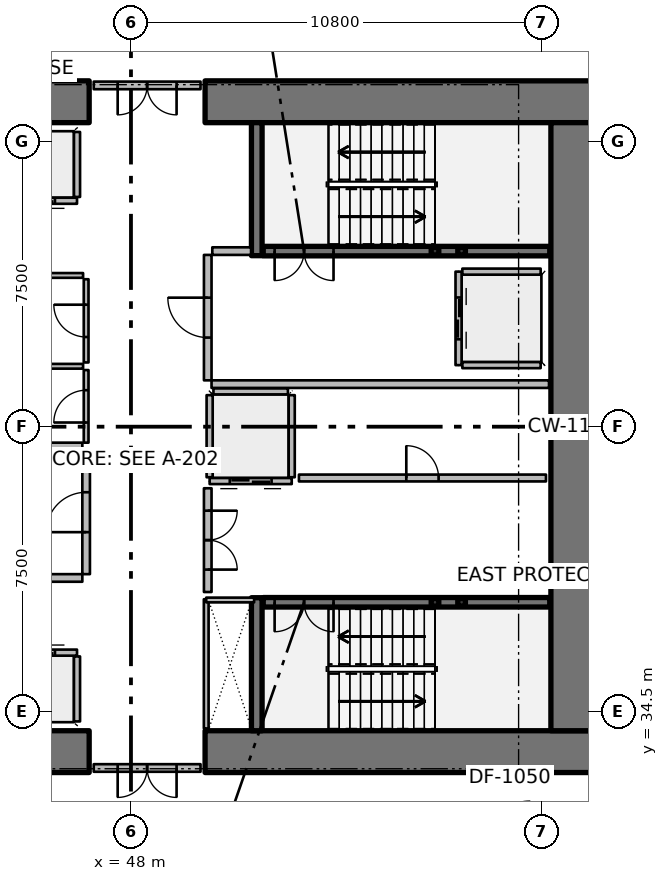
"""IFC4 building model, lengths in metres.
Left out: names, types, materials, properties, quantities, classifications, styles, units other than length and angle.
Written with IfcOpenShell. Run it as: python <this file> out.ifc"""

import sys

from ifc_helpers import new_model, si_unit, direction, frame, frame_2d, origin, origin_2d, place, context, subcontext, project, spatial, rectangle, hollow_rectangle, extrude, element, fill, save


model = new_model("IFC4")
c1 = context("Model", 3, precision=1e-05, world=origin(), true_north=direction((0.0, 1.0)))
c2 = subcontext(c1, "Body", "Model", "MODEL_VIEW")
j1 = project(units=[si_unit("LENGTHUNIT", "METRE"), si_unit("PLANEANGLEUNIT", "RADIAN")], contexts=[c1])
p1 = place(None, origin())
s1 = spatial("IfcSite", under=j1, at=p1, CompositionType="ELEMENT")
p2 = place(p1, origin())
s2 = spatial("IfcBuilding", under=s1, at=p2, CompositionType="ELEMENT")
p3 = place(p2, origin())
s3 = spatial("IfcBuildingStorey", under=s2, at=p3, CompositionType="ELEMENT", Elevation=0.0)
for number, where, z_axis, x_axis in (
    (1, (36.7, 33.45, 0.0), (0.0, 0.0, 1.0), (1.0, 0.0, 0.0)),
    (2, (49.95, 33.45, 0.0), (0.0, 0.0, 1.0), (1.0, 0.0, 0.0)),
    (3, (36.7, 50.55, 0.0), (0.0, 0.0, 1.0), (1.0, 0.0, 0.0)),
    (4, (49.95, 50.55, 0.0), (0.0, 0.0, 1.0), (1.0, 0.0, 0.0)),
):
    element("IfcWall", number, at=place(p3, frame(where, z_axis=z_axis, x_axis=x_axis)), inside=s3, PredefinedType="SHEAR", context=c2, shape_type="SweptSolid", body=[
        extrude(rectangle(XDim=10.2, YDim=1.1, at=frame_2d((5.1, 0.0))), origin(), (0.0, 0.0, 1.0), 7.2),
    ])
p4 = place(p3, frame((59.6, 34.0, 0.0), z_axis=(0.0, 0.0, 1.0), x_axis=(0.0, 1.0, 0.0)))
e5 = element("IfcWall", 5, at=p4, inside=s3, PredefinedType="SHEAR", context=c2, shape_type="SweptSolid", body=[
    extrude(rectangle(XDim=16.0, YDim=1.1, at=frame_2d((8.0, 0.0))), origin(), (0.0, 0.0, 1.0), 7.2),
])
for number, where, z_axis, x_axis in (
    (6, (51.31, 46.5, 0.0), (0.0, 0.0, 1.0), (0.0, 1.0, 0.0)),
    (7, (51.31, 34.0, 0.0), (0.0, 0.0, 1.0), (0.0, 1.0, 0.0)),
):
    element("IfcWall", number, at=place(p3, frame(where, z_axis=z_axis, x_axis=x_axis)), inside=s3, PredefinedType="SHEAR", context=c2, shape_type="SweptSolid", body=[
        extrude(rectangle(XDim=3.5, YDim=0.28, at=frame_2d((1.75, 0.0))), origin(), (0.0, 0.0, 1.0), 7.2),
    ])
p5 = place(p3, frame((56.0, 46.62, 0.0), z_axis=(0.0, 0.0, 1.0), x_axis=(1.0, 0.0, 0.0)))
e8 = element("IfcColumn", 8, at=p5, inside=s3, PredefinedType="COLUMN", context=c2, shape_type="SweptSolid", body=[
    extrude(hollow_rectangle(XDim=0.2, YDim=0.2, WallThickness=0.01, InnerFilletRadius=0.01, OuterFilletRadius=0.02, at=origin_2d()), origin(), (0.0, 0.0, 1.0), 1.595),
])
p6 = place(p3, frame((56.7, 46.62, 0.0), z_axis=(0.0, 0.0, 1.0), x_axis=(1.0, 0.0, 0.0)))
e9 = element("IfcColumn", 9, at=p6, inside=s3, PredefinedType="COLUMN", context=c2, shape_type="SweptSolid", body=[
    extrude(hollow_rectangle(XDim=0.2, YDim=0.2, WallThickness=0.01, InnerFilletRadius=0.01, OuterFilletRadius=0.02, at=origin_2d()), origin(), (0.0, 0.0, 1.0), 5.195),
])
p7 = place(p3, frame((56.0, 37.38, 0.0), z_axis=(0.0, 0.0, 1.0), x_axis=(1.0, 0.0, 0.0)))
e10 = element("IfcColumn", 10, at=p7, inside=s3, PredefinedType="COLUMN", context=c2, shape_type="SweptSolid", body=[
    extrude(hollow_rectangle(XDim=0.2, YDim=0.2, WallThickness=0.01, InnerFilletRadius=0.01, OuterFilletRadius=0.02, at=origin_2d()), origin(), (0.0, 0.0, 1.0), 1.595),
])
p8 = place(p3, frame((56.7, 37.38, 0.0), z_axis=(0.0, 0.0, 1.0), x_axis=(1.0, 0.0, 0.0)))
e11 = element("IfcColumn", 11, at=p8, inside=s3, PredefinedType="COLUMN", context=c2, shape_type="SweptSolid", body=[
    extrude(hollow_rectangle(XDim=0.2, YDim=0.2, WallThickness=0.01, InnerFilletRadius=0.01, OuterFilletRadius=0.02, at=origin_2d()), origin(), (0.0, 0.0, 1.0), 5.195),
])
p9 = place(p3, frame((51.48, 46.62, 0.0), z_axis=(0.0, 0.0, 1.0), x_axis=(1.0, 0.0, 0.0)))
e12 = element("IfcWall", 12, at=p9, inside=s3, PredefinedType="SOLIDWALL", context=c2, shape_type="SweptSolid", body=[
    extrude(rectangle(XDim=7.54, YDim=0.25, at=frame_2d((3.77, 0.0))), origin(), (0.0, 0.0, 1.0), 6.8),
])
p10 = place(p9, frame((0.3, 0.0, 0.0)))
e13 = element("IfcOpeningElement", 13, at=p10, cuts=e12, PredefinedType="OPENING", context=c2, shape_type="SweptSolid", body=[
    extrude(rectangle(XDim=1.55, YDim=2.15, at=frame_2d((0.775, 1.075))), frame((0.0, 0.135, 0.0), z_axis=(0.0, -1.0, 0.0), x_axis=(1.0, 0.0, 0.0)), (0.0, 0.0, 1.0), 0.27),
])
p11 = place(p3, frame((51.48, 37.38, 0.0), z_axis=(0.0, 0.0, 1.0), x_axis=(1.0, 0.0, 0.0)))
e14 = element("IfcWall", 14, at=p11, inside=s3, PredefinedType="SOLIDWALL", context=c2, shape_type="SweptSolid", body=[
    extrude(rectangle(XDim=7.54, YDim=0.25, at=frame_2d((3.77, 0.0))), origin(), (0.0, 0.0, 1.0), 6.8),
])
p12 = place(p11, frame((0.3, 0.0, 0.0)))
e15 = element("IfcOpeningElement", 15, at=p12, cuts=e14, PredefinedType="OPENING", context=c2, shape_type="SweptSolid", body=[
    extrude(rectangle(XDim=1.55, YDim=2.15, at=frame_2d((0.775, 1.075))), frame((0.0, 0.135, 0.0), z_axis=(0.0, -1.0, 0.0), x_axis=(1.0, 0.0, 0.0)), (0.0, 0.0, 1.0), 0.27),
])
p13 = place(p3, frame((46.58, 47.945, 0.0), z_axis=(0.0, 0.0, 1.0), x_axis=(-1.0, 0.0, 0.0)))
e16 = element("IfcWall", 16, at=p13, inside=s3, PredefinedType="PARTITIONING", context=c2, shape_type="SweptSolid", body=[
    extrude(rectangle(XDim=2.26, YDim=0.16, at=frame_2d((1.13, 0.0))), origin(), (0.0, 0.0, 1.0), 6.8),
])
p14 = place(p13, frame((0.58, 0.0, 0.0)))
e17 = element("IfcOpeningElement", 17, at=p14, cuts=e16, PredefinedType="OPENING", context=c2, shape_type="SweptSolid", body=[
    extrude(rectangle(XDim=1.1, YDim=2.1, at=frame_2d((0.55, 1.05))), frame((0.0, 0.09, 0.0), z_axis=(0.0, -1.0, 0.0), x_axis=(1.0, 0.0, 0.0)), (0.0, 0.0, 1.0), 0.18),
])
p15 = place(p3, frame((46.58, 48.045, 0.0), z_axis=(0.0, 0.0, 1.0), x_axis=(0.0, 1.0, 0.0)))
e18 = element("IfcWall", 18, at=p15, inside=s3, PredefinedType="PARTITIONING", context=c2, shape_type="SweptSolid", body=[
    extrude(rectangle(XDim=1.71, YDim=0.16, at=frame_2d((0.855, 0.0))), origin(), (0.0, 0.0, 1.0), 6.8),
])
p16 = place(p3, frame((44.32, 36.055, 0.0), z_axis=(0.0, 0.0, 1.0), x_axis=(1.0, 0.0, 0.0)))
e19 = element("IfcWall", 19, at=p16, inside=s3, PredefinedType="PARTITIONING", context=c2, shape_type="SweptSolid", body=[
    extrude(rectangle(XDim=2.26, YDim=0.16, at=frame_2d((1.13, 0.0))), origin(), (0.0, 0.0, 1.0), 6.8),
])
p17 = place(p16, frame((0.58, 0.0, 0.0)))
e20 = element("IfcOpeningElement", 20, at=p17, cuts=e19, PredefinedType="OPENING", context=c2, shape_type="SweptSolid", body=[
    extrude(rectangle(XDim=1.1, YDim=2.1, at=frame_2d((0.55, 1.05))), frame((0.0, 0.09, 0.0), z_axis=(0.0, -1.0, 0.0), x_axis=(1.0, 0.0, 0.0)), (0.0, 0.0, 1.0), 0.18),
])
p18 = place(p3, frame((46.58, 34.245, 0.0), z_axis=(0.0, 0.0, 1.0), x_axis=(0.0, 1.0, 0.0)))
e21 = element("IfcWall", 21, at=p18, inside=s3, PredefinedType="PARTITIONING", context=c2, shape_type="SweptSolid", body=[
    extrude(rectangle(XDim=1.71, YDim=0.16, at=frame_2d((0.855, 0.0))), origin(), (0.0, 0.0, 1.0), 6.8),
])
p19 = place(p3, frame((56.62, 46.08, 0.0), z_axis=(0.0, 0.0, 1.0), x_axis=(0.0, -1.0, 0.0)))
e22 = element("IfcWall", 22, at=p19, inside=s3, PredefinedType="PARTITIONING", context=c2, shape_type="SweptSolid", body=[
    extrude(rectangle(XDim=2.46, YDim=0.16, at=frame_2d((1.23, 0.0))), origin(), (0.0, 0.0, 1.0), 6.8),
])
p20 = place(p19, frame((0.68, 0.0, 0.0)))
e23 = element("IfcOpeningElement", 23, at=p20, cuts=e22, PredefinedType="OPENING", context=c2, shape_type="SweptSolid", body=[
    extrude(rectangle(XDim=1.1, YDim=2.1, at=frame_2d((0.55, 1.05))), frame((0.0, 0.09, 0.0), z_axis=(0.0, -1.0, 0.0), x_axis=(1.0, 0.0, 0.0)), (0.0, 0.0, 1.0), 0.18),
])
for number, where, z_axis, x_axis in (
    (24, (56.72, 46.08, 0.0), (0.0, 0.0, 1.0), (1.0, 0.0, 0.0)),
    (25, (56.72, 43.62, 0.0), (0.0, 0.0, 1.0), (1.0, 0.0, 0.0)),
):
    element("IfcWall", number, at=place(p3, frame(where, z_axis=z_axis, x_axis=x_axis)), inside=s3, PredefinedType="PARTITIONING", context=c2, shape_type="SweptSolid", body=[
        extrude(rectangle(XDim=2.06, YDim=0.16, at=frame_2d((1.03, 0.0))), origin(), (0.0, 0.0, 1.0), 6.8),
    ])
p21 = place(p3, frame((52.23, 40.57, 0.0), z_axis=(0.0, 0.0, 1.0), x_axis=(-1.0, 0.0, 0.0)))
e26 = element("IfcWall", 26, at=p21, inside=s3, PredefinedType="PARTITIONING", context=c2, shape_type="SweptSolid", body=[
    extrude(rectangle(XDim=2.16, YDim=0.16, at=frame_2d((1.08, 0.0))), origin(), (0.0, 0.0, 1.0), 6.8),
])
p22 = place(p21, frame((0.53, 0.0, 0.0)))
e27 = element("IfcOpeningElement", 27, at=p22, cuts=e26, PredefinedType="OPENING", context=c2, shape_type="SweptSolid", body=[
    extrude(rectangle(XDim=1.1, YDim=2.1, at=frame_2d((0.55, 1.05))), frame((0.0, 0.09, 0.0), z_axis=(0.0, -1.0, 0.0), x_axis=(1.0, 0.0, 0.0)), (0.0, 0.0, 1.0), 0.18),
])
for number, where, z_axis, x_axis in (
    (28, (52.23, 40.67, 0.0), (0.0, 0.0, 1.0), (0.0, 1.0, 0.0)),
    (29, (50.07, 40.67, 0.0), (0.0, 0.0, 1.0), (0.0, 1.0, 0.0)),
):
    element("IfcWall", number, at=place(p3, frame(where, z_axis=z_axis, x_axis=x_axis)), inside=s3, PredefinedType="PARTITIONING", context=c2, shape_type="SweptSolid", body=[
        extrude(rectangle(XDim=2.16, YDim=0.16, at=frame_2d((1.08, 0.0))), origin(), (0.0, 0.0, 1.0), 6.8),
    ])
p23 = place(p3, frame((50.17, 42.93, 0.0), z_axis=(0.0, 0.0, 1.0), x_axis=(1.0, 0.0, 0.0)))
e30 = element("IfcWall", 30, at=p23, inside=s3, PredefinedType="PARTITIONING", context=c2, shape_type="SweptSolid", body=[
    extrude(rectangle(XDim=1.96, YDim=0.16, at=frame_2d((0.98, 0.0))), origin(), (0.0, 0.0, 1.0), 6.8),
])
p24 = place(p3, frame((52.42, 40.65, 0.0), z_axis=(0.0, 0.0, 1.0), x_axis=(1.0, 0.0, 0.0)))
e31 = element("IfcWall", 31, at=p24, inside=s3, PredefinedType="PARTITIONING", context=c2, shape_type="SweptSolid", body=[
    extrude(rectangle(XDim=6.5, YDim=0.18, at=frame_2d((3.25, 0.0))), origin(), (0.0, 0.0, 1.0), 6.8),
])
p25 = place(p24, frame((2.825, 0.0, 0.0)))
e32 = element("IfcOpeningElement", 32, at=p25, cuts=e31, PredefinedType="OPENING", context=c2, shape_type="SweptSolid", body=[
    extrude(rectangle(XDim=0.85, YDim=2.06, at=frame_2d((0.425, 1.03))), frame((0.0, 0.1, 0.0), z_axis=(0.0, -1.0, 0.0), x_axis=(1.0, 0.0, 0.0)), (0.0, 0.0, 1.0), 0.2),
])
p26 = place(p3, frame((47.02, 50.98, 0.0), z_axis=(0.0, 0.0, 1.0), x_axis=(1.0, 0.0, 0.0)))
e33 = element("IfcWall", 33, at=p26, inside=s3, PredefinedType="PARTITIONING", context=c2, shape_type="SweptSolid", body=[
    extrude(rectangle(XDim=2.81, YDim=0.2, at=frame_2d((1.405, 0.0))), origin(), (0.0, 0.0, 1.0), 6.8),
])
p27 = place(p26, frame((0.63, 0.0, 0.0)))
e34 = element("IfcOpeningElement", 34, at=p27, cuts=e33, PredefinedType="OPENING", context=c2, shape_type="SweptSolid", body=[
    extrude(rectangle(XDim=1.55, YDim=2.15, at=frame_2d((0.775, 1.075))), frame((0.0, 0.11, 0.0), z_axis=(0.0, -1.0, 0.0), x_axis=(1.0, 0.0, 0.0)), (0.0, 0.0, 1.0), 0.22),
])
p28 = place(p3, frame((47.02, 33.02, 0.0), z_axis=(0.0, 0.0, 1.0), x_axis=(1.0, 0.0, 0.0)))
e35 = element("IfcWall", 35, at=p28, inside=s3, PredefinedType="PARTITIONING", context=c2, shape_type="SweptSolid", body=[
    extrude(rectangle(XDim=2.81, YDim=0.2, at=frame_2d((1.405, 0.0))), origin(), (0.0, 0.0, 1.0), 6.8),
])
p29 = place(p28, frame((0.63, 0.0, 0.0)))
e36 = element("IfcOpeningElement", 36, at=p29, cuts=e35, PredefinedType="OPENING", context=c2, shape_type="SweptSolid", body=[
    extrude(rectangle(XDim=1.55, YDim=2.15, at=frame_2d((0.775, 1.075))), frame((0.0, 0.11, 0.0), z_axis=(0.0, -1.0, 0.0), x_axis=(1.0, 0.0, 0.0)), (0.0, 0.0, 1.0), 0.22),
])
p30 = place(p3, frame((50.02, 37.65, 0.0), z_axis=(0.0, 0.0, 1.0), x_axis=(0.0, 1.0, 0.0)))
e37 = element("IfcWall", 37, at=p30, inside=s3, PredefinedType="PARTITIONING", context=c2, shape_type="SweptSolid", body=[
    extrude(rectangle(XDim=2.73, YDim=0.2, at=frame_2d((1.365, 0.0))), origin(), (0.0, 0.0, 1.0), 6.8),
])
p31 = place(p30, frame((0.59, 0.0, 0.0)))
e38 = element("IfcOpeningElement", 38, at=p31, cuts=e37, PredefinedType="OPENING", context=c2, shape_type="SweptSolid", body=[
    extrude(rectangle(XDim=1.55, YDim=2.15, at=frame_2d((0.775, 1.075))), frame((0.0, 0.11, 0.0), z_axis=(0.0, -1.0, 0.0), x_axis=(1.0, 0.0, 0.0)), (0.0, 0.0, 1.0), 0.22),
])
p32 = place(p3, frame((41.35, 38.02, 0.0), z_axis=(0.0, 0.0, 1.0), x_axis=(1.0, 0.0, 0.0)))
e39 = element("IfcWall", 39, at=p32, inside=s3, PredefinedType="PARTITIONING", context=c2, shape_type="SweptSolid", body=[
    extrude(rectangle(XDim=5.37, YDim=0.2, at=frame_2d((2.685, 0.0))), origin(), (0.0, 0.0, 1.0), 6.8),
])
p33 = place(p3, frame((43.92, 41.48, 0.0), z_axis=(0.0, 0.0, 1.0), x_axis=(1.0, 0.0, 0.0)))
e40 = element("IfcWall", 40, at=p33, inside=s3, PredefinedType="PARTITIONING", context=c2, shape_type="SweptSolid", body=[
    extrude(rectangle(XDim=2.8, YDim=0.2, at=frame_2d((1.4, 0.0))), origin(), (0.0, 0.0, 1.0), 6.8),
])
p34 = place(p3, frame((46.82, 38.12, 0.0), z_axis=(0.0, 0.0, 1.0), x_axis=(0.0, 1.0, 0.0)))
e41 = element("IfcWall", 41, at=p34, inside=s3, PredefinedType="PARTITIONING", context=c2, shape_type="SweptSolid", body=[
    extrude(rectangle(XDim=3.26, YDim=0.2, at=frame_2d((1.63, 0.0))), origin(), (0.0, 0.0, 1.0), 6.8),
])
p35 = place(p34, frame((1.105, 0.0, 0.0)))
e42 = element("IfcOpeningElement", 42, at=p35, cuts=e41, PredefinedType="OPENING", context=c2, shape_type="SweptSolid", body=[
    extrude(rectangle(XDim=1.05, YDim=2.1, at=frame_2d((0.525, 1.05))), frame((0.0, 0.11, 0.0), z_axis=(0.0, -1.0, 0.0), x_axis=(1.0, 0.0, 0.0)), (0.0, 0.0, 1.0), 0.22),
])
p36 = place(p3, frame((50.12, 43.12, 0.0), z_axis=(0.0, 0.0, 1.0), x_axis=(1.0, 0.0, 0.0)))
e43 = element("IfcWall", 43, at=p36, inside=s3, PredefinedType="PARTITIONING", context=c2, shape_type="SweptSolid", body=[
    extrude(rectangle(XDim=8.88, YDim=0.2, at=frame_2d((4.44, 0.0))), origin(), (0.0, 0.0, 1.0), 6.8),
])
p37 = place(p3, frame((50.14, 46.62, 0.0), z_axis=(0.0, 0.0, 1.0), x_axis=(1.0, 0.0, 0.0)))
e44 = element("IfcWall", 44, at=p37, inside=s3, PredefinedType="PARTITIONING", context=c2, shape_type="SweptSolid", body=[
    extrude(rectangle(XDim=1.02, YDim=0.2, at=frame_2d((0.51, 0.0))), origin(), (0.0, 0.0, 1.0), 6.8),
])
p38 = place(p3, frame((50.02, 43.22, 0.0), z_axis=(0.0, 0.0, 1.0), x_axis=(0.0, 1.0, 0.0)))
e45 = element("IfcWall", 45, at=p38, inside=s3, PredefinedType="PARTITIONING", context=c2, shape_type="SweptSolid", body=[
    extrude(rectangle(XDim=3.3, YDim=0.2, at=frame_2d((1.65, 0.0))), origin(), (0.0, 0.0, 1.0), 6.8),
])
p39 = place(p38, frame((1.125, 0.0, 0.0)))
e46 = element("IfcOpeningElement", 46, at=p39, cuts=e45, PredefinedType="OPENING", context=c2, shape_type="SweptSolid", body=[
    extrude(rectangle(XDim=1.05, YDim=2.1, at=frame_2d((0.525, 1.05))), frame((0.0, 0.11, 0.0), z_axis=(0.0, -1.0, 0.0), x_axis=(1.0, 0.0, 0.0)), (0.0, 0.0, 1.0), 0.22),
])
p40 = place(p3, frame((49.98, 34.06, 0.0), z_axis=(0.0, 0.0, 1.0), x_axis=(0.0, 1.0, 0.0)))
e47 = element("IfcWall", 47, at=p40, inside=s3, PredefinedType="PARTITIONING", context=c2, shape_type="SweptSolid", body=[
    extrude(rectangle(XDim=3.4, YDim=0.125, at=frame_2d((1.7, 0.0))), origin(), (0.0, 0.0, 1.0), 6.24),
])
p41 = place(p3, frame((49.98, 37.44, 0.0), z_axis=(0.0, 0.0, 1.0), x_axis=(1.0, 0.0, 0.0)))
e48 = element("IfcWall", 48, at=p41, inside=s3, PredefinedType="PARTITIONING", context=c2, shape_type="SweptSolid", body=[
    extrude(rectangle(XDim=1.26, YDim=0.125, at=frame_2d((0.63, 0.0))), origin(), (0.0, 0.0, 1.0), 6.24),
])
p42 = place(p3, frame((44.03, 43.59, 0.0), z_axis=(0.0, 0.0, 1.0), x_axis=(1.0, 0.0, 0.0)))
e49 = element("IfcWall", 49, at=p42, inside=s3, PredefinedType="PARTITIONING", context=c2, shape_type="SweptSolid", body=[
    extrude(rectangle(XDim=2.71, YDim=0.125, at=frame_2d((1.355, 0.0))), origin(), (0.0, 0.0, 1.0), 6.24),
])
p43 = place(p3, frame((46.82, 41.58, 0.0), z_axis=(0.0, 0.0, 1.0), x_axis=(0.0, 1.0, 0.0)))
e50 = element("IfcWall", 50, at=p43, inside=s3, PredefinedType="PARTITIONING", context=c2, shape_type="SweptSolid", body=[
    extrude(rectangle(XDim=1.91, YDim=0.125, at=frame_2d((0.955, 0.0))), origin(), (0.0, 0.0, 1.0), 6.24),
])
p44 = place(p43, frame((0.53, 0.0, 0.0)))
e51 = element("IfcOpeningElement", 51, at=p44, cuts=e50, PredefinedType="OPENING", context=c2, shape_type="SweptSolid", body=[
    extrude(rectangle(XDim=0.85, YDim=2.06, at=frame_2d((0.425, 1.03))), frame((0.0, 0.073, 0.0), z_axis=(0.0, -1.0, 0.0), x_axis=(1.0, 0.0, 0.0)), (0.0, 0.0, 1.0), 0.145),
])
p45 = place(p3, frame((46.82, 43.69, 0.0), z_axis=(0.0, 0.0, 1.0), x_axis=(0.0, 1.0, 0.0)))
e52 = element("IfcWall", 52, at=p45, inside=s3, PredefinedType="PARTITIONING", context=c2, shape_type="SweptSolid", body=[
    extrude(rectangle(XDim=2.19, YDim=0.125, at=frame_2d((1.095, 0.0))), origin(), (0.0, 0.0, 1.0), 6.24),
])
p46 = place(p45, frame((0.67, 0.0, 0.0)))
e53 = element("IfcOpeningElement", 53, at=p46, cuts=e52, PredefinedType="OPENING", context=c2, shape_type="SweptSolid", body=[
    extrude(rectangle(XDim=0.85, YDim=2.06, at=frame_2d((0.425, 1.03))), frame((0.0, 0.073, 0.0), z_axis=(0.0, -1.0, 0.0), x_axis=(1.0, 0.0, 0.0)), (0.0, 0.0, 1.0), 0.145),
])
p47 = place(p3, frame((45.48, 45.98, 0.0), z_axis=(0.0, 0.0, 1.0), x_axis=(1.0, 0.0, 0.0)))
e54 = element("IfcWall", 54, at=p47, inside=s3, PredefinedType="PARTITIONING", context=c2, shape_type="SweptSolid", body=[
    extrude(rectangle(XDim=1.26, YDim=0.125, at=frame_2d((0.63, 0.0))), origin(), (0.0, 0.0, 1.0), 6.24),
])
p48 = place(p10, origin())
e55 = element("IfcDoor", 55, at=p48, inside=s3, OperationType="DOUBLE_DOOR_SINGLE_SWING", PredefinedType="DOOR", context=c2, shape_type="SweptSolid", body=[
    extrude(rectangle(XDim=1.55, YDim=2.15, at=frame_2d((0.775, 1.075))), frame((0.0, 0.025, 0.0), z_axis=(0.0, -1.0, 0.0), x_axis=(1.0, 0.0, 0.0)), (0.0, 0.0, 1.0), 0.05),
])
fill(e13, e55)
p49 = place(p12, origin())
e56 = element("IfcDoor", 56, at=p49, inside=s3, OperationType="DOUBLE_DOOR_SINGLE_SWING", PredefinedType="DOOR", context=c2, shape_type="SweptSolid", body=[
    extrude(rectangle(XDim=1.55, YDim=2.15, at=frame_2d((0.775, 1.075))), frame((0.0, 0.025, 0.0), z_axis=(0.0, -1.0, 0.0), x_axis=(1.0, 0.0, 0.0)), (0.0, 0.0, 1.0), 0.05),
])
fill(e15, e56)
p50 = place(p14, origin())
e57 = element("IfcDoor", 57, at=p50, inside=s3, OperationType="DOUBLE_DOOR_SLIDING", PredefinedType="DOOR", context=c2, shape_type="SweptSolid", body=[
    extrude(rectangle(XDim=1.1, YDim=2.1, at=frame_2d((0.55, 1.05))), frame((0.0, 0.025, 0.0), z_axis=(0.0, -1.0, 0.0), x_axis=(1.0, 0.0, 0.0)), (0.0, 0.0, 1.0), 0.05),
])
fill(e17, e57)
p51 = place(p17, origin())
e58 = element("IfcDoor", 58, at=p51, inside=s3, OperationType="DOUBLE_DOOR_SLIDING", PredefinedType="DOOR", context=c2, shape_type="SweptSolid", body=[
    extrude(rectangle(XDim=1.1, YDim=2.1, at=frame_2d((0.55, 1.05))), frame((0.0, 0.025, 0.0), z_axis=(0.0, -1.0, 0.0), x_axis=(1.0, 0.0, 0.0)), (0.0, 0.0, 1.0), 0.05),
])
fill(e20, e58)
p52 = place(p20, origin())
e59 = element("IfcDoor", 59, at=p52, inside=s3, OperationType="DOUBLE_DOOR_SLIDING", PredefinedType="DOOR", context=c2, shape_type="SweptSolid", body=[
    extrude(rectangle(XDim=1.1, YDim=2.1, at=frame_2d((0.55, 1.05))), frame((0.0, 0.025, 0.0), z_axis=(0.0, -1.0, 0.0), x_axis=(1.0, 0.0, 0.0)), (0.0, 0.0, 1.0), 0.05),
])
fill(e23, e59)
p53 = place(p22, origin())
e60 = element("IfcDoor", 60, at=p53, inside=s3, OperationType="DOUBLE_DOOR_SLIDING", PredefinedType="DOOR", context=c2, shape_type="SweptSolid", body=[
    extrude(rectangle(XDim=1.1, YDim=2.1, at=frame_2d((0.55, 1.05))), frame((0.0, 0.025, 0.0), z_axis=(0.0, -1.0, 0.0), x_axis=(1.0, 0.0, 0.0)), (0.0, 0.0, 1.0), 0.05),
])
fill(e27, e60)
p54 = place(p25, origin())
e61 = element("IfcDoor", 61, at=p54, inside=s3, OperationType="SINGLE_SWING_LEFT", PredefinedType="DOOR", context=c2, shape_type="SweptSolid", body=[
    extrude(rectangle(XDim=0.85, YDim=2.06, at=frame_2d((0.425, 1.03))), frame((0.0, 0.025, 0.0), z_axis=(0.0, -1.0, 0.0), x_axis=(1.0, 0.0, 0.0)), (0.0, 0.0, 1.0), 0.05),
])
fill(e32, e61)
p55 = place(p27, origin())
e62 = element("IfcDoor", 62, at=p55, inside=s3, OperationType="DOUBLE_DOOR_SINGLE_SWING", PredefinedType="DOOR", context=c2, shape_type="SweptSolid", body=[
    extrude(rectangle(XDim=1.55, YDim=2.15, at=frame_2d((0.775, 1.075))), frame((0.0, 0.025, 0.0), z_axis=(0.0, -1.0, 0.0), x_axis=(1.0, 0.0, 0.0)), (0.0, 0.0, 1.0), 0.05),
])
fill(e34, e62)
p56 = place(p29, origin())
e63 = element("IfcDoor", 63, at=p56, inside=s3, OperationType="DOUBLE_DOOR_SINGLE_SWING", PredefinedType="DOOR", context=c2, shape_type="SweptSolid", body=[
    extrude(rectangle(XDim=1.55, YDim=2.15, at=frame_2d((0.775, 1.075))), frame((0.0, 0.025, 0.0), z_axis=(0.0, -1.0, 0.0), x_axis=(1.0, 0.0, 0.0)), (0.0, 0.0, 1.0), 0.05),
])
fill(e36, e63)
p57 = place(p31, origin())
e64 = element("IfcDoor", 64, at=p57, inside=s3, OperationType="DOUBLE_DOOR_SINGLE_SWING", PredefinedType="DOOR", context=c2, shape_type="SweptSolid", body=[
    extrude(rectangle(XDim=1.55, YDim=2.15, at=frame_2d((0.775, 1.075))), frame((0.0, 0.025, 0.0), z_axis=(0.0, -1.0, 0.0), x_axis=(1.0, 0.0, 0.0)), (0.0, 0.0, 1.0), 0.05),
])
fill(e38, e64)
p58 = place(p35, origin())
e65 = element("IfcDoor", 65, at=p58, inside=s3, OperationType="SINGLE_SWING_LEFT", PredefinedType="DOOR", context=c2, shape_type="SweptSolid", body=[
    extrude(rectangle(XDim=1.05, YDim=2.1, at=frame_2d((0.525, 1.05))), frame((0.0, 0.025, 0.0), z_axis=(0.0, -1.0, 0.0), x_axis=(1.0, 0.0, 0.0)), (0.0, 0.0, 1.0), 0.05),
])
fill(e42, e65)
p59 = place(p39, origin())
e66 = element("IfcDoor", 66, at=p59, inside=s3, OperationType="SINGLE_SWING_RIGHT", PredefinedType="DOOR", context=c2, shape_type="SweptSolid", body=[
    extrude(rectangle(XDim=1.05, YDim=2.1, at=frame_2d((0.525, 1.05))), frame((0.0, 0.025, 0.0), z_axis=(0.0, -1.0, 0.0), x_axis=(1.0, 0.0, 0.0)), (0.0, 0.0, 1.0), 0.05),
])
fill(e46, e66)
p60 = place(p44, origin())
e67 = element("IfcDoor", 67, at=p60, inside=s3, OperationType="SINGLE_SWING_LEFT", PredefinedType="DOOR", context=c2, shape_type="SweptSolid", body=[
    extrude(rectangle(XDim=0.85, YDim=2.06, at=frame_2d((0.425, 1.03))), frame((0.0, 0.025, 0.0), z_axis=(0.0, -1.0, 0.0), x_axis=(1.0, 0.0, 0.0)), (0.0, 0.0, 1.0), 0.05),
])
fill(e51, e67)
p61 = place(p46, origin())
e68 = element("IfcDoor", 68, at=p61, inside=s3, OperationType="SINGLE_SWING_RIGHT", PredefinedType="DOOR", context=c2, shape_type="SweptSolid", body=[
    extrude(rectangle(XDim=0.85, YDim=2.06, at=frame_2d((0.425, 1.03))), frame((0.0, 0.025, 0.0), z_axis=(0.0, -1.0, 0.0), x_axis=(1.0, 0.0, 0.0)), (0.0, 0.0, 1.0), 0.05),
])
fill(e53, e68)
save(model, sys.argv[1])
